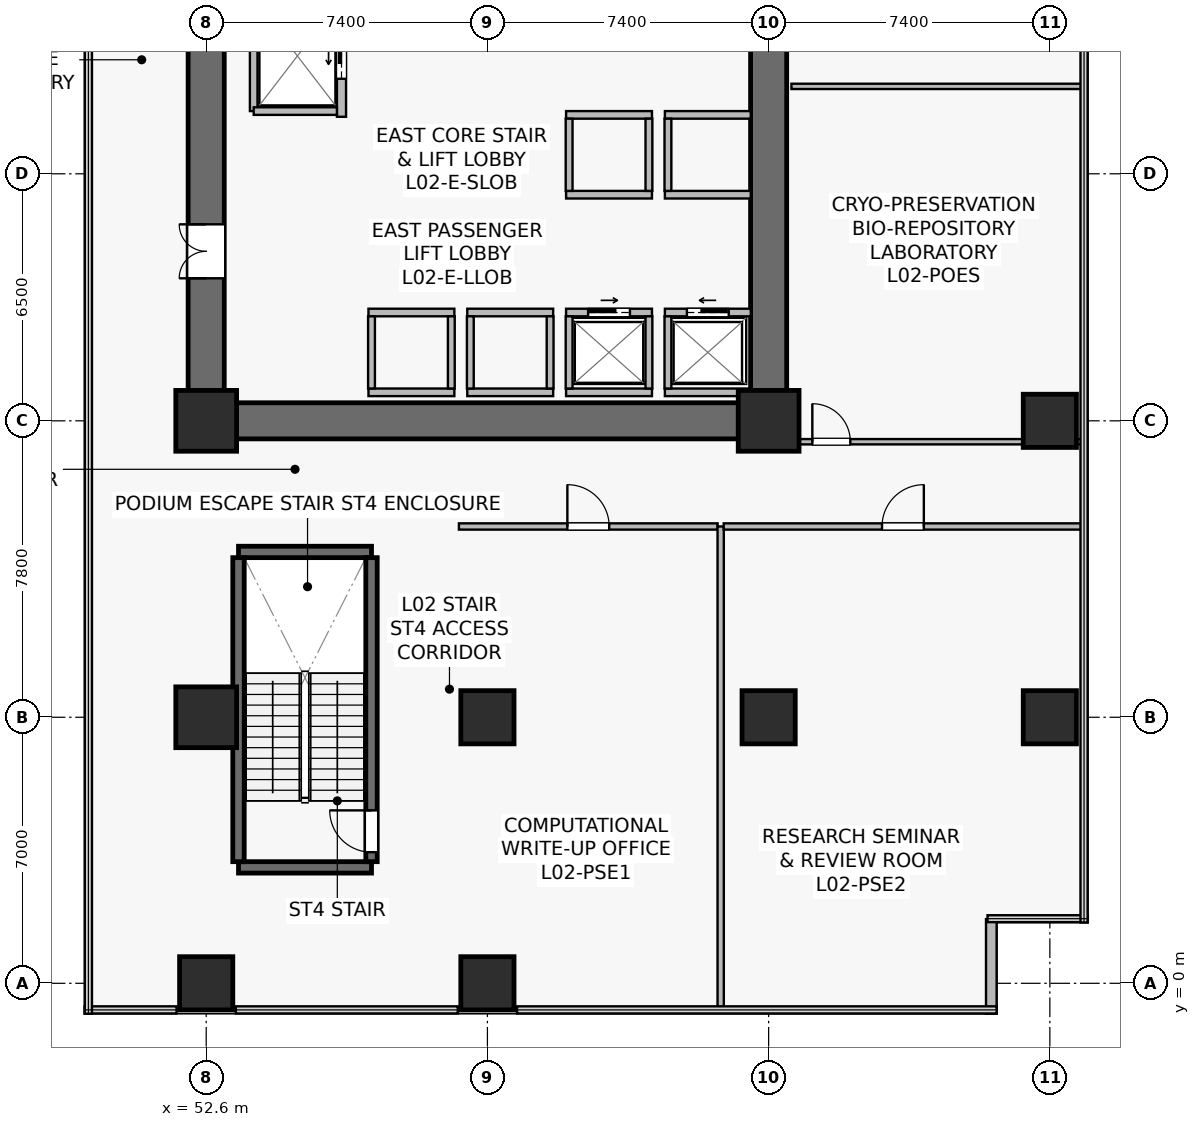
"""IFC4 building model, lengths in metres.
Left out: names, types, materials, properties, quantities, classifications, styles, units other than length and angle.
Written with IfcOpenShell. Run it as: python <this file> out.ifc"""

import sys

from ifc_helpers import new_model, si_unit, direction, frame, frame_2d, origin, origin_2d, place, context, subcontext, project, spatial, rectangle, extrude, source, transform, mapped, element, fill, save


model = new_model("IFC4")
c1 = context("Model", 3, precision=1e-05, world=origin(), true_north=direction((0.0, 1.0)))
c2 = subcontext(c1, "Body", "Model", "MODEL_VIEW")
j1 = project(units=[si_unit("LENGTHUNIT", "METRE"), si_unit("PLANEANGLEUNIT", "RADIAN")], contexts=[c1])
p1 = place(None, origin())
s1 = spatial("IfcSite", under=j1, at=p1, CompositionType="ELEMENT")
p2 = place(p1, origin())
s2 = spatial("IfcBuilding", under=s1, at=p2, CompositionType="ELEMENT")
p3 = place(p2, frame((0.0, 0.0, 5.4)))
s3 = spatial("IfcBuildingStorey", under=s2, at=p3, CompositionType="ELEMENT", Elevation=5.4)
p4 = place(p3, frame((52.125, 14.8, 0.0), z_axis=(0.0, 0.0, 1.0), x_axis=(1.0, 0.0, 0.0)))
e1 = element("IfcWall", 1, at=p4, inside=s3, PredefinedType="SHEAR", context=c2, shape_type="SweptSolid", body=[
    extrude(rectangle(XDim=15.75, YDim=0.95, at=frame_2d((7.875, 0.0))), origin(), (0.0, 0.0, 1.0), 4.45),
])
p5 = place(p3, frame((52.6, 15.275, 0.0), z_axis=(0.0, 0.0, 1.0), x_axis=(0.0, 1.0, 0.0)))
e2 = element("IfcWall", 2, at=p5, inside=s3, PredefinedType="SHEAR", context=c2, shape_type="SweptSolid", body=[
    extrude(rectangle(XDim=18.05, YDim=0.95, at=frame_2d((9.025, 0.0))), origin(), (0.0, 0.0, 1.0), 4.45),
])
p6 = place(p5, frame((3.275, 0.0, 0.0)))
e3 = element("IfcOpeningElement", 3, at=p6, cuts=e2, PredefinedType="OPENING", context=c2, shape_type="SweptSolid", body=[
    extrude(rectangle(XDim=1.42, YDim=2.2, at=frame_2d((0.71, 1.1))), frame((0.0, 0.485, 0.0), z_axis=(0.0, -1.0, 0.0), x_axis=(1.0, 0.0, 0.0)), (0.0, 0.0, 1.0), 0.97),
])
p7 = place(p3, frame((67.4, 15.275, 0.0), z_axis=(0.0, 0.0, 1.0), x_axis=(0.0, 1.0, 0.0)))
e4 = element("IfcWall", 4, at=p7, inside=s3, PredefinedType="SHEAR", context=c2, shape_type="SweptSolid", body=[
    extrude(rectangle(XDim=18.05, YDim=0.95, at=frame_2d((9.025, 0.0))), origin(), (0.0, 0.0, 1.0), 4.45),
])
for number, where, z_axis, x_axis in (
    (5, (53.45, 3.05, 0.0), (0.0, 0.0, 1.0), (1.0, 0.0, 0.0)),
    (6, (53.45, 11.35, 0.0), (0.0, 0.0, 1.0), (1.0, 0.0, 0.0)),
):
    element("IfcWall", number, at=place(p3, frame(where, z_axis=z_axis, x_axis=x_axis)), inside=s3, PredefinedType="SHEAR", context=c2, shape_type="SweptSolid", body=[
        extrude(rectangle(XDim=3.5, YDim=0.3, at=frame_2d((1.75, 0.0))), origin(), (0.0, 0.0, 1.0), 4.45),
    ])
p8 = place(p3, frame((53.45, 3.2, 0.0), z_axis=(0.0, 0.0, 1.0), x_axis=(0.0, 1.0, 0.0)))
e7 = element("IfcWall", 7, at=p8, inside=s3, PredefinedType="SHEAR", context=c2, shape_type="SweptSolid", body=[
    extrude(rectangle(XDim=8.0, YDim=0.3, at=frame_2d((4.0, 0.0))), origin(), (0.0, 0.0, 1.0), 4.45),
])
p9 = place(p3, frame((56.95, 3.2, 0.0), z_axis=(0.0, 0.0, 1.0), x_axis=(0.0, 1.0, 0.0)))
e8 = element("IfcWall", 8, at=p9, inside=s3, PredefinedType="SHEAR", context=c2, shape_type="SweptSolid", body=[
    extrude(rectangle(XDim=8.0, YDim=0.3, at=frame_2d((4.0, 0.0))), origin(), (0.0, 0.0, 1.0), 4.45),
])
p10 = place(p9, frame((0.25, 0.0, 0.0)))
e9 = element("IfcOpeningElement", 9, at=p10, cuts=e8, PredefinedType="OPENING", context=c2, shape_type="SweptSolid", body=[
    extrude(rectangle(XDim=1.1, YDim=2.15, at=frame_2d((0.55, 1.075))), frame((0.0, 0.16, 0.0), z_axis=(0.0, -1.0, 0.0), x_axis=(1.0, 0.0, 0.0)), (0.0, 0.0, 1.0), 0.32),
])
m1 = source(origin(), c2, "Body", "SweptSolid", [
    extrude(rectangle(XDim=1.6, YDim=1.6, at=origin_2d()), origin(), (0.0, 0.0, 1.0), 4.8),
])
p11 = place(p3, frame((52.6, 7.0, 0.0), z_axis=(0.0, 0.0, 1.0), x_axis=(1.0, 0.0, 0.0)))
e10 = element("IfcColumn", 10, at=p11, inside=s3, PredefinedType="COLUMN", context=c2, shape_type="MappedRepresentation", body=[
    mapped(m1, transform((0.0, 0.0, 0.0), scale=1.0)),
])
m2 = source(origin(), c2, "Body", "SweptSolid", [
    extrude(rectangle(XDim=1.4, YDim=1.4, at=origin_2d()), origin(), (0.0, 0.0, 1.0), 4.8),
])
p12 = place(p3, frame((60.0, 7.0, 0.0), z_axis=(0.0, 0.0, 1.0), x_axis=(1.0, 0.0, 0.0)))
e11 = element("IfcColumn", 11, at=p12, inside=s3, PredefinedType="COLUMN", context=c2, shape_type="MappedRepresentation", body=[
    mapped(m2, transform((0.0, 0.0, 0.0), scale=1.0)),
])
for number, where, z_axis, x_axis in (
    (12, (52.6, 14.8, 0.0), (0.0, 0.0, 1.0), (1.0, 0.0, 0.0)),
    (13, (67.4, 14.8, 0.0), (0.0, 0.0, 1.0), (1.0, 0.0, 0.0)),
):
    element("IfcColumn", number, at=place(p3, frame(where, z_axis=z_axis, x_axis=x_axis)), inside=s3, PredefinedType="COLUMN", context=c2, shape_type="MappedRepresentation", body=[
        mapped(m1, transform((0.0, 0.0, 0.0), scale=1.0)),
    ])
for number, where, z_axis, x_axis in (
    (14, (67.4, 7.0, 0.0), (0.0, 0.0, 1.0), (1.0, 0.0, 0.0)),
    (15, (74.8, 7.0, 0.0), (0.0, 0.0, 1.0), (1.0, 0.0, 0.0)),
    (16, (74.8, 14.8, 0.0), (0.0, 0.0, 1.0), (1.0, 0.0, 0.0)),
    (17, (52.6, 0.0, 0.0), (0.0, 0.0, 1.0), (1.0, 0.0, 0.0)),
    (18, (60.0, 0.0, 0.0), (0.0, 0.0, 1.0), (1.0, 0.0, 0.0)),
):
    element("IfcColumn", number, at=place(p3, frame(where, z_axis=z_axis, x_axis=x_axis)), inside=s3, PredefinedType="COLUMN", context=c2, shape_type="MappedRepresentation", body=[
        mapped(m2, transform((0.0, 0.0, 0.0), scale=1.0)),
    ])
p13 = place(p3, frame((73.26, -0.8, 0.0), z_axis=(0.0, 0.0, 1.0), x_axis=(0.0, 1.0, 0.0)))
e19 = element("IfcWall", 19, at=p13, inside=s3, PredefinedType="STANDARD", context=c2, shape_type="SweptSolid", body=[
    extrude(rectangle(XDim=2.488, YDim=0.28, at=frame_2d((1.244, 0.0))), origin(), (0.0, 0.0, 1.0), 4.45),
])
p14 = place(p3, frame((56.16, 22.8, 0.0), z_axis=(0.0, 0.0, 1.0), x_axis=(0.0, 1.0, 0.0)))
e20 = element("IfcWall", 20, at=p14, inside=s3, PredefinedType="SOLIDWALL", context=c2, shape_type="SweptSolid", body=[
    extrude(rectangle(XDim=6.85, YDim=0.24, at=frame_2d((3.425, 0.0))), origin(), (0.0, 0.0, 1.0), 3.535),
])
p15 = place(p14, frame((4.85, 0.0, 0.0)))
e21 = element("IfcOpeningElement", 21, at=p15, cuts=e20, PredefinedType="OPENING", context=c2, shape_type="SweptSolid", body=[
    extrude(rectangle(XDim=1.1, YDim=2.22, at=frame_2d((0.55, 1.11))), frame((0.0, 0.13, 0.0), z_axis=(0.0, -1.0, 0.0), x_axis=(1.0, 0.0, 0.0)), (0.0, 0.0, 1.0), 0.26),
])
p16 = place(p14, frame((1.0, 0.0, 0.0)))
e22 = element("IfcOpeningElement", 22, at=p16, cuts=e20, PredefinedType="OPENING", context=c2, shape_type="SweptSolid", body=[
    extrude(rectangle(XDim=1.2, YDim=2.22, at=frame_2d((0.6, 1.11))), frame((0.0, 0.13, 0.0), z_axis=(0.0, -1.0, 0.0), x_axis=(1.0, 0.0, 0.0)), (0.0, 0.0, 1.0), 0.26),
])
p17 = place(p3, frame((64.67, 17.65, 0.0), z_axis=(0.0, 0.0, 1.0), x_axis=(1.0, 0.0, 0.0)))
e23 = element("IfcWall", 23, at=p17, inside=s3, PredefinedType="SOLIDWALL", context=c2, shape_type="SweptSolid", body=[
    extrude(rectangle(XDim=2.26, YDim=0.2, at=frame_2d((1.13, 0.0))), origin(), (0.0, 0.0, 1.0), 4.45),
])
p18 = place(p17, frame((0.58, 0.0, 0.0)))
e24 = element("IfcOpeningElement", 24, at=p18, cuts=e23, PredefinedType="OPENING", context=c2, shape_type="SweptSolid", body=[
    extrude(rectangle(XDim=1.1, YDim=2.22, at=frame_2d((0.55, 1.11))), frame((0.0, 0.11, 0.0), z_axis=(0.0, -1.0, 0.0), x_axis=(1.0, 0.0, 0.0)), (0.0, 0.0, 1.0), 0.22),
])
p19 = place(p3, frame((64.67, 15.55, 0.0), z_axis=(0.0, 0.0, 1.0), x_axis=(1.0, 0.0, 0.0)))
e25 = element("IfcWall", 25, at=p19, inside=s3, PredefinedType="SOLIDWALL", context=c2, shape_type="SweptSolid", body=[
    extrude(rectangle(XDim=2.26, YDim=0.2, at=frame_2d((1.13, 0.0))), origin(), (0.0, 0.0, 1.0), 4.45),
])
p20 = place(p3, frame((64.75, 15.65, 0.0), z_axis=(0.0, 0.0, 1.0), x_axis=(0.0, 1.0, 0.0)))
e26 = element("IfcWall", 26, at=p20, inside=s3, PredefinedType="SOLIDWALL", context=c2, shape_type="SweptSolid", body=[
    extrude(rectangle(XDim=1.9, YDim=0.18, at=frame_2d((0.95, 0.0))), origin(), (0.0, 0.0, 1.0), 4.45),
])
p21 = place(p3, frame((62.07, 17.65, 0.0), z_axis=(0.0, 0.0, 1.0), x_axis=(1.0, 0.0, 0.0)))
e27 = element("IfcWall", 27, at=p21, inside=s3, PredefinedType="SOLIDWALL", context=c2, shape_type="SweptSolid", body=[
    extrude(rectangle(XDim=2.26, YDim=0.2, at=frame_2d((1.13, 0.0))), origin(), (0.0, 0.0, 1.0), 4.45),
])
p22 = place(p21, frame((0.58, 0.0, 0.0)))
e28 = element("IfcOpeningElement", 28, at=p22, cuts=e27, PredefinedType="OPENING", context=c2, shape_type="SweptSolid", body=[
    extrude(rectangle(XDim=1.1, YDim=2.22, at=frame_2d((0.55, 1.11))), frame((0.0, 0.11, 0.0), z_axis=(0.0, -1.0, 0.0), x_axis=(1.0, 0.0, 0.0)), (0.0, 0.0, 1.0), 0.22),
])
p23 = place(p3, frame((62.07, 15.55, 0.0), z_axis=(0.0, 0.0, 1.0), x_axis=(1.0, 0.0, 0.0)))
e29 = element("IfcWall", 29, at=p23, inside=s3, PredefinedType="SOLIDWALL", context=c2, shape_type="SweptSolid", body=[
    extrude(rectangle(XDim=2.26, YDim=0.2, at=frame_2d((1.13, 0.0))), origin(), (0.0, 0.0, 1.0), 4.45),
])
for number, where, z_axis, x_axis in (
    (30, (62.15, 15.65, 0.0), (0.0, 0.0, 1.0), (0.0, 1.0, 0.0)),
    (31, (64.25, 15.65, 0.0), (0.0, 0.0, 1.0), (0.0, 1.0, 0.0)),
):
    element("IfcWall", number, at=place(p3, frame(where, z_axis=z_axis, x_axis=x_axis)), inside=s3, PredefinedType="SOLIDWALL", context=c2, shape_type="SweptSolid", body=[
        extrude(rectangle(XDim=1.9, YDim=0.18, at=frame_2d((0.95, 0.0))), origin(), (0.0, 0.0, 1.0), 4.45),
    ])
for number, where, z_axis, x_axis in (
    (32, (59.47, 17.65, 0.0), (0.0, 0.0, 1.0), (1.0, 0.0, 0.0)),
    (33, (59.47, 15.55, 0.0), (0.0, 0.0, 1.0), (1.0, 0.0, 0.0)),
):
    element("IfcWall", number, at=place(p3, frame(where, z_axis=z_axis, x_axis=x_axis)), inside=s3, PredefinedType="SOLIDWALL", context=c2, shape_type="SweptSolid", body=[
        extrude(rectangle(XDim=2.26, YDim=0.2, at=frame_2d((1.13, 0.0))), origin(), (0.0, 0.0, 1.0), 3.735),
    ])
for number, where, z_axis, x_axis in (
    (34, (59.55, 15.65, 0.0), (0.0, 0.0, 1.0), (0.0, 1.0, 0.0)),
    (35, (61.65, 15.65, 0.0), (0.0, 0.0, 1.0), (0.0, 1.0, 0.0)),
):
    element("IfcWall", number, at=place(p3, frame(where, z_axis=z_axis, x_axis=x_axis)), inside=s3, PredefinedType="SOLIDWALL", context=c2, shape_type="SweptSolid", body=[
        extrude(rectangle(XDim=1.9, YDim=0.18, at=frame_2d((0.95, 0.0))), origin(), (0.0, 0.0, 1.0), 4.45),
    ])
for number, where, z_axis, x_axis in (
    (36, (56.87, 17.65, 0.0), (0.0, 0.0, 1.0), (1.0, 0.0, 0.0)),
    (37, (56.87, 15.55, 0.0), (0.0, 0.0, 1.0), (1.0, 0.0, 0.0)),
):
    element("IfcWall", number, at=place(p3, frame(where, z_axis=z_axis, x_axis=x_axis)), inside=s3, PredefinedType="SOLIDWALL", context=c2, shape_type="SweptSolid", body=[
        extrude(rectangle(XDim=2.26, YDim=0.2, at=frame_2d((1.13, 0.0))), origin(), (0.0, 0.0, 1.0), 4.45),
    ])
for number, where, z_axis, x_axis in (
    (38, (56.95, 15.65, 0.0), (0.0, 0.0, 1.0), (0.0, 1.0, 0.0)),
    (39, (59.05, 15.65, 0.0), (0.0, 0.0, 1.0), (0.0, 1.0, 0.0)),
):
    element("IfcWall", number, at=place(p3, frame(where, z_axis=z_axis, x_axis=x_axis)), inside=s3, PredefinedType="SOLIDWALL", context=c2, shape_type="SweptSolid", body=[
        extrude(rectangle(XDim=1.9, YDim=0.18, at=frame_2d((0.95, 0.0))), origin(), (0.0, 0.0, 1.0), 4.45),
    ])
for number, where, z_axis, x_axis in (
    (40, (64.67, 20.75, 0.0), (0.0, 0.0, 1.0), (1.0, 0.0, 0.0)),
    (41, (64.67, 22.85, 0.0), (0.0, 0.0, 1.0), (1.0, 0.0, 0.0)),
):
    element("IfcWall", number, at=place(p3, frame(where, z_axis=z_axis, x_axis=x_axis)), inside=s3, PredefinedType="SOLIDWALL", context=c2, shape_type="SweptSolid", body=[
        extrude(rectangle(XDim=2.26, YDim=0.2, at=frame_2d((1.13, 0.0))), origin(), (0.0, 0.0, 1.0), 4.45),
    ])
p24 = place(p3, frame((64.75, 20.85, 0.0), z_axis=(0.0, 0.0, 1.0), x_axis=(0.0, 1.0, 0.0)))
e42 = element("IfcWall", 42, at=p24, inside=s3, PredefinedType="SOLIDWALL", context=c2, shape_type="SweptSolid", body=[
    extrude(rectangle(XDim=1.9, YDim=0.18, at=frame_2d((0.95, 0.0))), origin(), (0.0, 0.0, 1.0), 4.45),
])
for number, where, z_axis, x_axis in (
    (43, (62.07, 20.75, 0.0), (0.0, 0.0, 1.0), (1.0, 0.0, 0.0)),
    (44, (62.07, 22.85, 0.0), (0.0, 0.0, 1.0), (1.0, 0.0, 0.0)),
):
    element("IfcWall", number, at=place(p3, frame(where, z_axis=z_axis, x_axis=x_axis)), inside=s3, PredefinedType="SOLIDWALL", context=c2, shape_type="SweptSolid", body=[
        extrude(rectangle(XDim=2.26, YDim=0.2, at=frame_2d((1.13, 0.0))), origin(), (0.0, 0.0, 1.0), 4.45),
    ])
for number, where, z_axis, x_axis in (
    (45, (62.15, 20.85, 0.0), (0.0, 0.0, 1.0), (0.0, 1.0, 0.0)),
    (46, (64.25, 20.85, 0.0), (0.0, 0.0, 1.0), (0.0, 1.0, 0.0)),
):
    element("IfcWall", number, at=place(p3, frame(where, z_axis=z_axis, x_axis=x_axis)), inside=s3, PredefinedType="SOLIDWALL", context=c2, shape_type="SweptSolid", body=[
        extrude(rectangle(XDim=1.9, YDim=0.18, at=frame_2d((0.95, 0.0))), origin(), (0.0, 0.0, 1.0), 4.45),
    ])
p25 = place(p3, frame((53.85, 22.95, 0.0), z_axis=(0.0, 0.0, 1.0), x_axis=(0.0, 1.0, 0.0)))
e47 = element("IfcWall", 47, at=p25, inside=s3, PredefinedType="SOLIDWALL", context=c2, shape_type="SweptSolid", body=[
    extrude(rectangle(XDim=2.9, YDim=0.2, at=frame_2d((1.45, 0.0))), origin(), (0.0, 0.0, 1.0), 3.535),
])
p26 = place(p3, frame((53.85, 22.95, 0.0), z_axis=(0.0, 0.0, 1.0), x_axis=(1.0, 0.0, 0.0)))
e48 = element("IfcWall", 48, at=p26, inside=s3, PredefinedType="SOLIDWALL", context=c2, shape_type="SweptSolid", body=[
    extrude(rectangle(XDim=2.19, YDim=0.2, at=frame_2d((1.095, 0.0))), origin(), (0.0, 0.0, 1.0), 4.45),
])
p27 = place(p3, frame((68.0, 23.6, 0.0), z_axis=(0.0, 0.0, 1.0), x_axis=(1.0, 0.0, 0.0)))
e49 = element("IfcWall", 49, at=p27, inside=s3, PredefinedType="PARTITIONING", context=c2, shape_type="SweptSolid", body=[
    extrude(rectangle(XDim=7.65, YDim=0.14, at=frame_2d((3.825, 0.0))), origin(), (0.0, 0.0, 1.0), 3.835),
])
p28 = place(p3, frame((68.0, 14.25, 0.0), z_axis=(0.0, 0.0, 1.0), x_axis=(1.0, 0.0, 0.0)))
e50 = element("IfcWall", 50, at=p28, inside=s3, PredefinedType="PARTITIONING", context=c2, shape_type="SweptSolid", body=[
    extrude(rectangle(XDim=7.65, YDim=0.14, at=frame_2d((3.825, 0.0))), origin(), (0.0, 0.0, 1.0), 3.835),
])
p29 = place(p28, frame((0.55, 0.0, 0.0)))
e51 = element("IfcOpeningElement", 51, at=p29, cuts=e50, PredefinedType="OPENING", context=c2, shape_type="SweptSolid", body=[
    extrude(rectangle(XDim=1.0, YDim=2.15, at=frame_2d((0.5, 1.075))), frame((0.0, 0.08, 0.0), z_axis=(0.0, -1.0, 0.0), x_axis=(1.0, 0.0, 0.0)), (0.0, 0.0, 1.0), 0.16),
])
p30 = place(p3, frame((59.25, 12.02, 0.0), z_axis=(0.0, 0.0, 1.0), x_axis=(1.0, 0.0, 0.0)))
e52 = element("IfcWall", 52, at=p30, inside=s3, PredefinedType="PARTITIONING", context=c2, shape_type="SweptSolid", body=[
    extrude(rectangle(XDim=6.808, YDim=0.165, at=frame_2d((3.404, 0.0))), origin(), (0.0, 0.0, 1.0), 3.735),
])
p31 = place(p30, frame((2.854, 0.0, 0.0)))
e53 = element("IfcOpeningElement", 53, at=p31, cuts=e52, PredefinedType="OPENING", context=c2, shape_type="SweptSolid", body=[
    extrude(rectangle(XDim=1.1, YDim=2.18, at=frame_2d((0.55, 1.09))), frame((0.0, 0.093, 0.0), z_axis=(0.0, -1.0, 0.0), x_axis=(1.0, 0.0, 0.0)), (0.0, 0.0, 1.0), 0.185),
])
p32 = place(p3, frame((66.138, -0.69, 0.0), z_axis=(0.0, 0.0, 1.0), x_axis=(0.0, 1.0, 0.0)))
e54 = element("IfcWall", 54, at=p32, inside=s3, PredefinedType="PARTITIONING", context=c2, shape_type="SweptSolid", body=[
    extrude(rectangle(XDim=12.71, YDim=0.165, at=frame_2d((6.355, 0.0))), origin(), (0.0, 0.0, 1.0), 3.635),
])
p33 = place(p3, frame((66.218, 12.02, 0.0), z_axis=(0.0, 0.0, 1.0), x_axis=(1.0, 0.0, 0.0)))
e55 = element("IfcWall", 55, at=p33, inside=s3, PredefinedType="PARTITIONING", context=c2, shape_type="SweptSolid", body=[
    extrude(rectangle(XDim=9.432, YDim=0.165, at=frame_2d((4.716, 0.0))), origin(), (0.0, 0.0, 1.0), 3.735),
])
p34 = place(p33, frame((4.166, 0.0, 0.0)))
e56 = element("IfcOpeningElement", 56, at=p34, cuts=e55, PredefinedType="OPENING", context=c2, shape_type="SweptSolid", body=[
    extrude(rectangle(XDim=1.1, YDim=2.18, at=frame_2d((0.55, 1.09))), frame((0.0, 0.093, 0.0), z_axis=(0.0, -1.0, 0.0), x_axis=(1.0, 0.0, 0.0)), (0.0, 0.0, 1.0), 0.185),
])
m3 = source(origin(), c2, "Body", "SweptSolid", [
    extrude(rectangle(XDim=1.1, YDim=2.22, at=frame_2d((0.55, 1.11))), frame((0.0, 0.025, 0.0), z_axis=(0.0, -1.0, 0.0), x_axis=(1.0, 0.0, 0.0)), (0.0, 0.0, 1.0), 0.05),
])
p35 = place(p18, origin())
e57 = element("IfcDoor", 57, at=p35, inside=s3, OperationType="SLIDING_TO_LEFT", PredefinedType="USERDEFINED", context=c2, shape_type="MappedRepresentation", body=[
    mapped(m3, transform((0.0, 0.0, 0.0), scale=1.0)),
])
fill(e24, e57)
p36 = place(p22, origin())
e58 = element("IfcDoor", 58, at=p36, inside=s3, OperationType="SLIDING_TO_RIGHT", PredefinedType="USERDEFINED", context=c2, shape_type="MappedRepresentation", body=[
    mapped(m3, transform((0.0, 0.0, 0.0), scale=1.0)),
])
fill(e28, e58)
m4 = source(origin(), c2, "Body", "SweptSolid", [
    extrude(rectangle(XDim=1.2, YDim=2.22, at=frame_2d((0.6, 1.11))), frame((0.0, 0.025, 0.0), z_axis=(0.0, -1.0, 0.0), x_axis=(1.0, 0.0, 0.0)), (0.0, 0.0, 1.0), 0.05),
])
p37 = place(p16, origin())
e59 = element("IfcDoor", 59, at=p37, inside=s3, OperationType="SLIDING_TO_LEFT", PredefinedType="USERDEFINED", context=c2, shape_type="MappedRepresentation", body=[
    mapped(m4, transform((0.0, 0.0, 0.0), scale=1.0)),
])
fill(e22, e59)
m5 = source(origin(), c2, "Body", "SweptSolid", [
    extrude(rectangle(XDim=1.42, YDim=2.2, at=frame_2d((0.71, 1.1))), frame((0.0, 0.025, 0.0), z_axis=(0.0, -1.0, 0.0), x_axis=(1.0, 0.0, 0.0)), (0.0, 0.0, 1.0), 0.05),
])
p38 = place(p6, origin())
e60 = element("IfcDoor", 60, at=p38, inside=s3, OperationType="DOUBLE_DOOR_SINGLE_SWING", PredefinedType="DOOR", context=c2, shape_type="MappedRepresentation", body=[
    mapped(m5, transform((0.0, 0.0, 0.0), scale=1.0)),
])
fill(e3, e60)
m6 = source(origin(), c2, "Body", "SweptSolid", [
    extrude(rectangle(XDim=1.1, YDim=2.15, at=frame_2d((0.55, 1.075))), frame((0.0, 0.025, 0.0), z_axis=(0.0, -1.0, 0.0), x_axis=(1.0, 0.0, 0.0)), (0.0, 0.0, 1.0), 0.05),
])
p39 = place(p10, origin())
e61 = element("IfcDoor", 61, at=p39, inside=s3, OperationType="SINGLE_SWING_RIGHT", PredefinedType="DOOR", context=c2, shape_type="MappedRepresentation", body=[
    mapped(m6, transform((0.0, 0.0, 0.0), scale=1.0)),
])
fill(e9, e61)
m7 = source(origin(), c2, "Body", "SweptSolid", [
    extrude(rectangle(XDim=1.0, YDim=2.15, at=frame_2d((0.5, 1.075))), frame((0.0, 0.025, 0.0), z_axis=(0.0, -1.0, 0.0), x_axis=(1.0, 0.0, 0.0)), (0.0, 0.0, 1.0), 0.05),
])
p40 = place(p29, origin())
e62 = element("IfcDoor", 62, at=p40, inside=s3, OperationType="SINGLE_SWING_LEFT", PredefinedType="DOOR", context=c2, shape_type="MappedRepresentation", body=[
    mapped(m7, transform((0.0, 0.0, 0.0), scale=1.0)),
])
fill(e51, e62)
m8 = source(origin(), c2, "Body", "SweptSolid", [
    extrude(rectangle(XDim=1.1, YDim=2.18, at=frame_2d((0.55, 1.09))), frame((0.0, 0.025, 0.0), z_axis=(0.0, -1.0, 0.0), x_axis=(1.0, 0.0, 0.0)), (0.0, 0.0, 1.0), 0.05),
])
p41 = place(p31, origin())
e63 = element("IfcDoor", 63, at=p41, inside=s3, OperationType="SINGLE_SWING_LEFT", PredefinedType="DOOR", context=c2, shape_type="MappedRepresentation", body=[
    mapped(m8, transform((0.0, 0.0, 0.0), scale=1.0)),
])
fill(e53, e63)
p42 = place(p34, origin())
e64 = element("IfcDoor", 64, at=p42, inside=s3, OperationType="SINGLE_SWING_RIGHT", PredefinedType="DOOR", context=c2, shape_type="MappedRepresentation", body=[
    mapped(m8, transform((0.0, 0.0, 0.0), scale=1.0)),
])
fill(e56, e64)
save(model, sys.argv[1])
